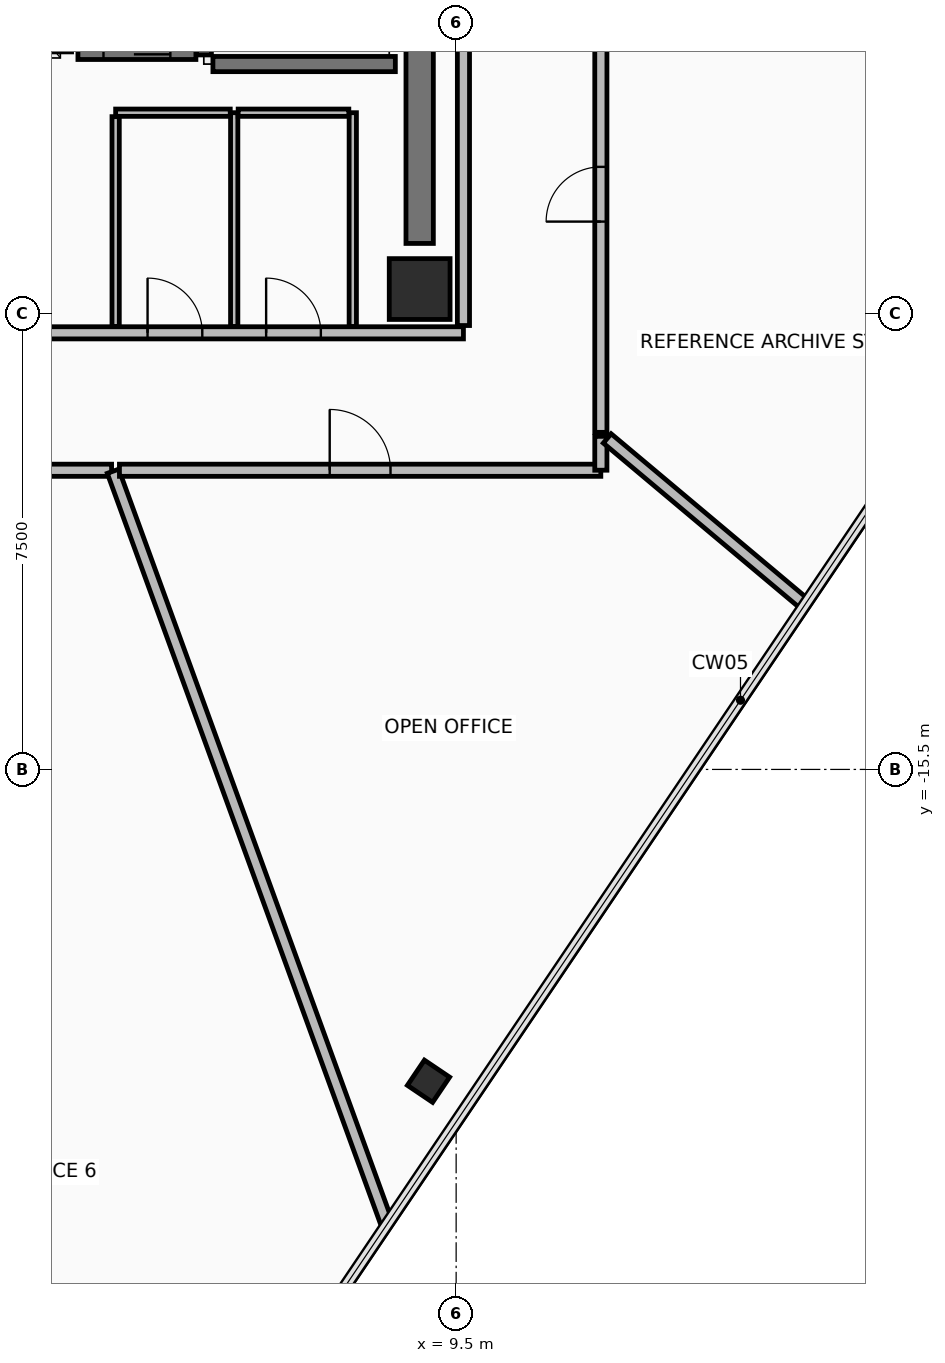
"""IFC4 building model, lengths in metres.
Left out: names, types, materials, properties, quantities, classifications, styles, units other than length and angle.
Written with IfcOpenShell. Run it as: python <this file> out.ifc"""

import sys

from ifc_helpers import new_model, si_unit, direction, frame, frame_2d, origin, origin_2d, place, context, subcontext, project, spatial, rectangle, hollow_rectangle, extrude, element, fill, save


model = new_model("IFC4")
c1 = context("Model", 3, precision=1e-05, world=origin(), true_north=direction((0.0, 1.0)))
c2 = subcontext(c1, "Body", "Model", "MODEL_VIEW")
j1 = project(units=[si_unit("LENGTHUNIT", "METRE"), si_unit("PLANEANGLEUNIT", "RADIAN")], contexts=[c1])
p1 = place(None, origin())
s1 = spatial("IfcSite", under=j1, at=p1, CompositionType="ELEMENT")
p2 = place(p1, origin())
s2 = spatial("IfcBuilding", under=s1, at=p2, CompositionType="ELEMENT")
p3 = place(p2, frame((0.0, 0.0, 237.85)))
s3 = spatial("IfcBuildingStorey", under=s2, at=p3, CompositionType="ELEMENT", Elevation=237.85)
p4 = place(p3, frame((8.9, -7.6, 0.0), z_axis=(0.0, 0.0, 1.0), x_axis=(1.0, 0.0, 0.0)))
e1 = element("IfcColumn", 1, at=p4, inside=s3, PredefinedType="COLUMN", context=c2, shape_type="SweptSolid", body=[
    extrude(rectangle(XDim=1.0, YDim=1.0, at=origin_2d()), origin(), (0.0, 0.0, 1.0), 3.6),
])
p5 = place(p3, frame((9.046, -20.628, 0.0), z_axis=(0.0, 0.0, 1.0), x_axis=(0.559194350413, 0.829036596578, 0.0)))
e2 = element("IfcColumn", 2, at=p5, inside=s3, PredefinedType="COLUMN", context=c2, shape_type="SweptSolid", body=[
    extrude(hollow_rectangle(XDim=0.5, YDim=0.5, WallThickness=0.032, at=origin_2d()), origin(), (0.0, 0.0, 1.0), 3.6),
])
p6 = place(p3, frame((8.9, -6.85, 0.0), z_axis=(0.0, 0.0, 1.0), x_axis=(0.0, 1.0, 0.0)))
e3 = element("IfcWall", 3, at=p6, inside=s3, PredefinedType="SHEAR", context=c2, shape_type="SweptSolid", body=[
    extrude(rectangle(XDim=10.7, YDim=0.45, at=frame_2d((5.35, 0.0))), origin(), (0.0, 0.0, 1.0), 3.42),
])
p7 = place(p3, frame((-9.62, -8.32, 0.0), z_axis=(0.0, 0.0, 1.0), x_axis=(1.0, 0.0, 0.0)))
e4 = element("IfcWall", 4, at=p7, inside=s3, PredefinedType="PARTITIONING", context=c2, shape_type="SweptSolid", body=[
    extrude(rectangle(XDim=19.24, YDim=0.2, at=frame_2d((9.62, 0.0))), origin(), (0.0, 0.0, 1.0), 2.915),
])
p8 = place(p7, frame((8.57, 0.0, 0.0)))
e5 = element("IfcOpeningElement", 5, at=p8, cuts=e4, PredefinedType="OPENING", context=c2, shape_type="SweptSolid", body=[
    extrude(rectangle(XDim=0.9, YDim=2.1, at=frame_2d((0.45, 1.05))), frame((0.0, 0.11, 0.0), z_axis=(0.0, -1.0, 0.0), x_axis=(1.0, 0.0, 0.0)), (0.0, 0.0, 1.0), 0.22),
])
p9 = place(p7, frame((14.045, 0.0, 0.0)))
e6 = element("IfcOpeningElement", 6, at=p9, cuts=e4, PredefinedType="OPENING", context=c2, shape_type="SweptSolid", body=[
    extrude(rectangle(XDim=0.9, YDim=2.1, at=frame_2d((0.45, 1.05))), frame((0.0, 0.11, 0.0), z_axis=(0.0, -1.0, 0.0), x_axis=(1.0, 0.0, 0.0)), (0.0, 0.0, 1.0), 0.22),
])
p10 = place(p7, frame((15.995, 0.0, 0.0)))
e7 = element("IfcOpeningElement", 7, at=p10, cuts=e4, PredefinedType="OPENING", context=c2, shape_type="SweptSolid", body=[
    extrude(rectangle(XDim=0.9, YDim=2.1, at=frame_2d((0.45, 1.05))), frame((0.0, 0.11, 0.0), z_axis=(0.0, -1.0, 0.0), x_axis=(1.0, 0.0, 0.0)), (0.0, 0.0, 1.0), 0.22),
])
p11 = place(p3, frame((9.62, -8.2, 0.0), z_axis=(0.0, 0.0, 1.0), x_axis=(0.0, 1.0, 0.0)))
e8 = element("IfcWall", 8, at=p11, inside=s3, PredefinedType="PARTITIONING", context=c2, shape_type="SweptSolid", body=[
    extrude(rectangle(XDim=16.4, YDim=0.2, at=frame_2d((8.2, 0.0))), origin(), (0.0, 0.0, 1.0), 2.915),
])
p12 = place(p11, frame((12.65, 0.0, 0.0)))
e9 = element("IfcOpeningElement", 9, at=p12, cuts=e8, PredefinedType="OPENING", context=c2, shape_type="SweptSolid", body=[
    extrude(rectangle(XDim=1.1, YDim=2.15, at=frame_2d((0.55, 1.075))), frame((0.0, 0.11, 0.0), z_axis=(0.0, -1.0, 0.0), x_axis=(1.0, 0.0, 0.0)), (0.0, 0.0, 1.0), 0.22),
])
p13 = place(p3, frame((5.35, -3.75, 0.0), z_axis=(0.0, 0.0, 1.0), x_axis=(0.0, 1.0, 0.0)))
e10 = element("IfcWall", 10, at=p13, inside=s3, PredefinedType="SHEAR", context=c2, shape_type="SweptSolid", body=[
    extrude(rectangle(XDim=7.3, YDim=0.25, at=frame_2d((3.65, 0.0))), origin(), (0.0, 0.0, 1.0), 3.42),
])
p14 = place(p3, frame((5.5, -3.9, 0.0), z_axis=(0.0, 0.0, 1.0), x_axis=(1.0, 0.0, 0.0)))
e11 = element("IfcWall", 11, at=p14, inside=s3, PredefinedType="SHEAR", context=c2, shape_type="SweptSolid", body=[
    extrude(rectangle(XDim=3.0, YDim=0.25, at=frame_2d((1.5, 0.0))), origin(), (0.0, 0.0, 1.0), 3.42),
])
p15 = place(p3, frame((1.13, -3.6, 0.0), z_axis=(0.0, 0.0, 1.0), x_axis=(1.0, 0.0, 0.0)))
e12 = element("IfcWall", 12, at=p15, inside=s3, PredefinedType="PARTITIONING", context=c2, shape_type="SweptSolid", body=[
    extrude(rectangle(XDim=2.045, YDim=0.2, at=frame_2d((1.022, 0.0))), origin(), (0.0, 0.0, 1.0), 3.42),
])
p16 = place(p3, frame((3.28, -3.7, 0.0), z_axis=(0.0, 0.0, 1.0), x_axis=(1.0, 0.0, 0.0)))
e13 = element("IfcWall", 13, at=p16, inside=s3, PredefinedType="SHEAR", context=c2, shape_type="SweptSolid", body=[
    extrude(rectangle(XDim=1.94, YDim=0.25, at=frame_2d((0.97, 0.0))), origin(), (0.0, 0.0, 1.0), 3.42),
])
p17 = place(p16, frame((0.42, 0.0, 0.0)))
e14 = element("IfcOpeningElement", 14, at=p17, cuts=e13, PredefinedType="OPENING", context=c2, shape_type="SweptSolid", body=[
    extrude(rectangle(XDim=1.1, YDim=2.2, at=frame_2d((0.55, 1.1))), frame((0.0, 0.135, 0.0), z_axis=(0.0, -1.0, 0.0), x_axis=(1.0, 0.0, 0.0)), (0.0, 0.0, 1.0), 0.27),
])
p18 = place(p3, frame((5.85, -8.215, 0.0), z_axis=(0.0, 0.0, 1.0), x_axis=(0.0, 1.0, 0.0)))
e15 = element("IfcWall", 15, at=p18, inside=s3, PredefinedType="PARTITIONING", context=c2, shape_type="SweptSolid", body=[
    extrude(rectangle(XDim=3.515, YDim=0.12, at=frame_2d((1.758, 0.0))), origin(), (0.0, 0.0, 1.0), 2.715),
])
p19 = place(p3, frame((5.785, -4.7, 0.0), z_axis=(0.0, 0.0, 1.0), x_axis=(-1.0, 0.0, 0.0)))
e16 = element("IfcWall", 16, at=p19, inside=s3, PredefinedType="PARTITIONING", context=c2, shape_type="SweptSolid", body=[
    extrude(rectangle(XDim=1.885, YDim=0.12, at=frame_2d((0.942, 0.0))), origin(), (0.0, 0.0, 1.0), 3.42),
])
p20 = place(p3, frame((3.9, -4.765, 0.0), z_axis=(0.0, 0.0, 1.0), x_axis=(0.0, -1.0, 0.0)))
e17 = element("IfcWall", 17, at=p20, inside=s3, PredefinedType="PARTITIONING", context=c2, shape_type="SweptSolid", body=[
    extrude(rectangle(XDim=3.45, YDim=0.12, at=frame_2d((1.725, 0.0))), origin(), (0.0, 0.0, 1.0), 2.715),
])
p21 = place(p3, frame((7.8, -8.215, 0.0), z_axis=(0.0, 0.0, 1.0), x_axis=(0.0, 1.0, 0.0)))
e18 = element("IfcWall", 18, at=p21, inside=s3, PredefinedType="PARTITIONING", context=c2, shape_type="SweptSolid", body=[
    extrude(rectangle(XDim=3.515, YDim=0.12, at=frame_2d((1.758, 0.0))), origin(), (0.0, 0.0, 1.0), 2.715),
])
p22 = place(p3, frame((7.735, -4.7, 0.0), z_axis=(0.0, 0.0, 1.0), x_axis=(-1.0, 0.0, 0.0)))
e19 = element("IfcWall", 19, at=p22, inside=s3, PredefinedType="PARTITIONING", context=c2, shape_type="SweptSolid", body=[
    extrude(rectangle(XDim=1.82, YDim=0.12, at=frame_2d((0.91, 0.0))), origin(), (0.0, 0.0, 1.0), 3.42),
])
p23 = place(p3, frame((-1.844, -10.58, 0.0), z_axis=(0.0, 0.0, 1.0), x_axis=(1.0, 0.0, 0.0)))
e20 = element("IfcWall", 20, at=p23, inside=s3, PredefinedType="PARTITIONING", context=c2, shape_type="SweptSolid", body=[
    extrude(rectangle(XDim=5.678, YDim=0.2, at=frame_2d((2.839, 0.0))), origin(), (0.0, 0.0, 1.0), 3.42),
])
p24 = place(p23, frame((2.339, 0.0, 0.0)))
e21 = element("IfcOpeningElement", 21, at=p24, cuts=e20, PredefinedType="OPENING", context=c2, shape_type="SweptSolid", body=[
    extrude(rectangle(XDim=1.0, YDim=2.15, at=frame_2d((0.5, 1.075))), frame((0.0, 0.11, 0.0), z_axis=(0.0, -1.0, 0.0), x_axis=(1.0, 0.0, 0.0)), (0.0, 0.0, 1.0), 0.22),
])
p25 = place(p3, frame((3.857, -10.596, 0.0), z_axis=(0.0, 0.0, 1.0), x_axis=(0.342028925495, -0.939689424291, 0.0)))
e22 = element("IfcWall", 22, at=p25, inside=s3, PredefinedType="PARTITIONING", context=c2, shape_type="SweptSolid", body=[
    extrude(rectangle(XDim=13.165, YDim=0.2, at=frame_2d((6.583, 0.0))), origin(), (0.0, 0.0, 1.0), 2.765),
])
p26 = place(p3, frame((3.963, -10.58, 0.0), z_axis=(0.0, 0.0, 1.0), x_axis=(1.0, 0.0, 0.0)))
e23 = element("IfcWall", 23, at=p26, inside=s3, PredefinedType="PARTITIONING", context=c2, shape_type="SweptSolid", body=[
    extrude(rectangle(XDim=7.917, YDim=0.2, at=frame_2d((3.958, 0.0))), origin(), (0.0, 0.0, 1.0), 2.915),
])
p27 = place(p26, frame((3.458, 0.0, 0.0)))
e24 = element("IfcOpeningElement", 24, at=p27, cuts=e23, PredefinedType="OPENING", context=c2, shape_type="SweptSolid", body=[
    extrude(rectangle(XDim=1.0, YDim=2.15, at=frame_2d((0.5, 1.075))), frame((0.0, 0.11, 0.0), z_axis=(0.0, -1.0, 0.0), x_axis=(1.0, 0.0, 0.0)), (0.0, 0.0, 1.0), 0.22),
])
p28 = place(p3, frame((11.88, -10.579, 0.0), z_axis=(0.0, 0.0, 1.0), x_axis=(0.0, 1.0, 0.0)))
e25 = element("IfcWall", 25, at=p28, inside=s3, PredefinedType="PARTITIONING", context=c2, shape_type="SweptSolid", body=[
    extrude(rectangle(XDim=0.557, YDim=0.2, at=frame_2d((0.279, 0.0))), origin(), (0.0, 0.0, 1.0), 3.115),
])
p29 = place(p3, frame((11.985, -10.057, 0.0), z_axis=(0.0, 0.0, 1.0), x_axis=(0.766014391555, -0.642823422045, 0.0)))
e26 = element("IfcWall", 26, at=p29, inside=s3, PredefinedType="PARTITIONING", context=c2, shape_type="SweptSolid", body=[
    extrude(rectangle(XDim=4.225, YDim=0.2, at=frame_2d((2.113, 0.0))), origin(), (0.0, 0.0, 1.0), 2.765),
])
p30 = place(p3, frame((11.88, -9.957, 0.0), z_axis=(0.0, 0.0, 1.0), x_axis=(0.0, 1.0, 0.0)))
e27 = element("IfcWall", 27, at=p30, inside=s3, PredefinedType="PARTITIONING", context=c2, shape_type="SweptSolid", body=[
    extrude(rectangle(XDim=7.832, YDim=0.2, at=frame_2d((3.916, 0.0))), origin(), (0.0, 0.0, 1.0), 2.915),
])
p31 = place(p30, frame((3.466, 0.0, 0.0)))
e28 = element("IfcOpeningElement", 28, at=p31, cuts=e27, PredefinedType="OPENING", context=c2, shape_type="SweptSolid", body=[
    extrude(rectangle(XDim=0.9, YDim=2.1, at=frame_2d((0.45, 1.05))), frame((0.0, 0.11, 0.0), z_axis=(0.0, -1.0, 0.0), x_axis=(1.0, 0.0, 0.0)), (0.0, 0.0, 1.0), 0.22),
])
p32 = place(p3, frame((11.912, -2.1, 0.0), z_axis=(0.0, 0.0, 1.0), x_axis=(0.984808741382, -0.17364257225, 0.0)))
e29 = element("IfcWall", 29, at=p32, inside=s3, PredefinedType="PARTITIONING", context=c2, shape_type="SweptSolid", body=[
    extrude(rectangle(XDim=9.561, YDim=0.2, at=frame_2d((4.78, 0.0))), origin(), (0.0, 0.0, 1.0), 2.765),
])
p33 = place(p17, origin())
e30 = element("IfcDoor", 30, at=p33, inside=s3, OperationType="SLIDING_TO_LEFT", PredefinedType="DOOR", context=c2, shape_type="SweptSolid", body=[
    extrude(rectangle(XDim=1.1, YDim=2.2, at=frame_2d((0.55, 1.1))), frame((0.0, 0.025, 0.0), z_axis=(0.0, -1.0, 0.0), x_axis=(1.0, 0.0, 0.0)), (0.0, 0.0, 1.0), 0.05),
])
fill(e14, e30)
p34 = place(p9, origin())
e31 = element("IfcDoor", 31, at=p34, inside=s3, OperationType="SINGLE_SWING_LEFT", PredefinedType="DOOR", context=c2, shape_type="SweptSolid", body=[
    extrude(rectangle(XDim=0.9, YDim=2.1, at=frame_2d((0.45, 1.05))), frame((0.0, 0.025, 0.0), z_axis=(0.0, -1.0, 0.0), x_axis=(1.0, 0.0, 0.0)), (0.0, 0.0, 1.0), 0.05),
])
fill(e6, e31)
p35 = place(p10, origin())
e32 = element("IfcDoor", 32, at=p35, inside=s3, OperationType="SINGLE_SWING_LEFT", PredefinedType="DOOR", context=c2, shape_type="SweptSolid", body=[
    extrude(rectangle(XDim=0.9, YDim=2.1, at=frame_2d((0.45, 1.05))), frame((0.0, 0.025, 0.0), z_axis=(0.0, -1.0, 0.0), x_axis=(1.0, 0.0, 0.0)), (0.0, 0.0, 1.0), 0.05),
])
fill(e7, e32)
p36 = place(p27, origin())
e33 = element("IfcDoor", 33, at=p36, inside=s3, OperationType="SINGLE_SWING_RIGHT", PredefinedType="DOOR", context=c2, shape_type="SweptSolid", body=[
    extrude(rectangle(XDim=1.0, YDim=2.15, at=frame_2d((0.5, 1.075))), frame((0.0, 0.025, 0.0), z_axis=(0.0, -1.0, 0.0), x_axis=(1.0, 0.0, 0.0)), (0.0, 0.0, 1.0), 0.05),
])
fill(e24, e33)
p37 = place(p31, origin())
e34 = element("IfcDoor", 34, at=p37, inside=s3, OperationType="SINGLE_SWING_LEFT", PredefinedType="DOOR", context=c2, shape_type="SweptSolid", body=[
    extrude(rectangle(XDim=0.9, YDim=2.1, at=frame_2d((0.45, 1.05))), frame((0.0, 0.025, 0.0), z_axis=(0.0, -1.0, 0.0), x_axis=(1.0, 0.0, 0.0)), (0.0, 0.0, 1.0), 0.05),
])
fill(e28, e34)
save(model, sys.argv[1])
